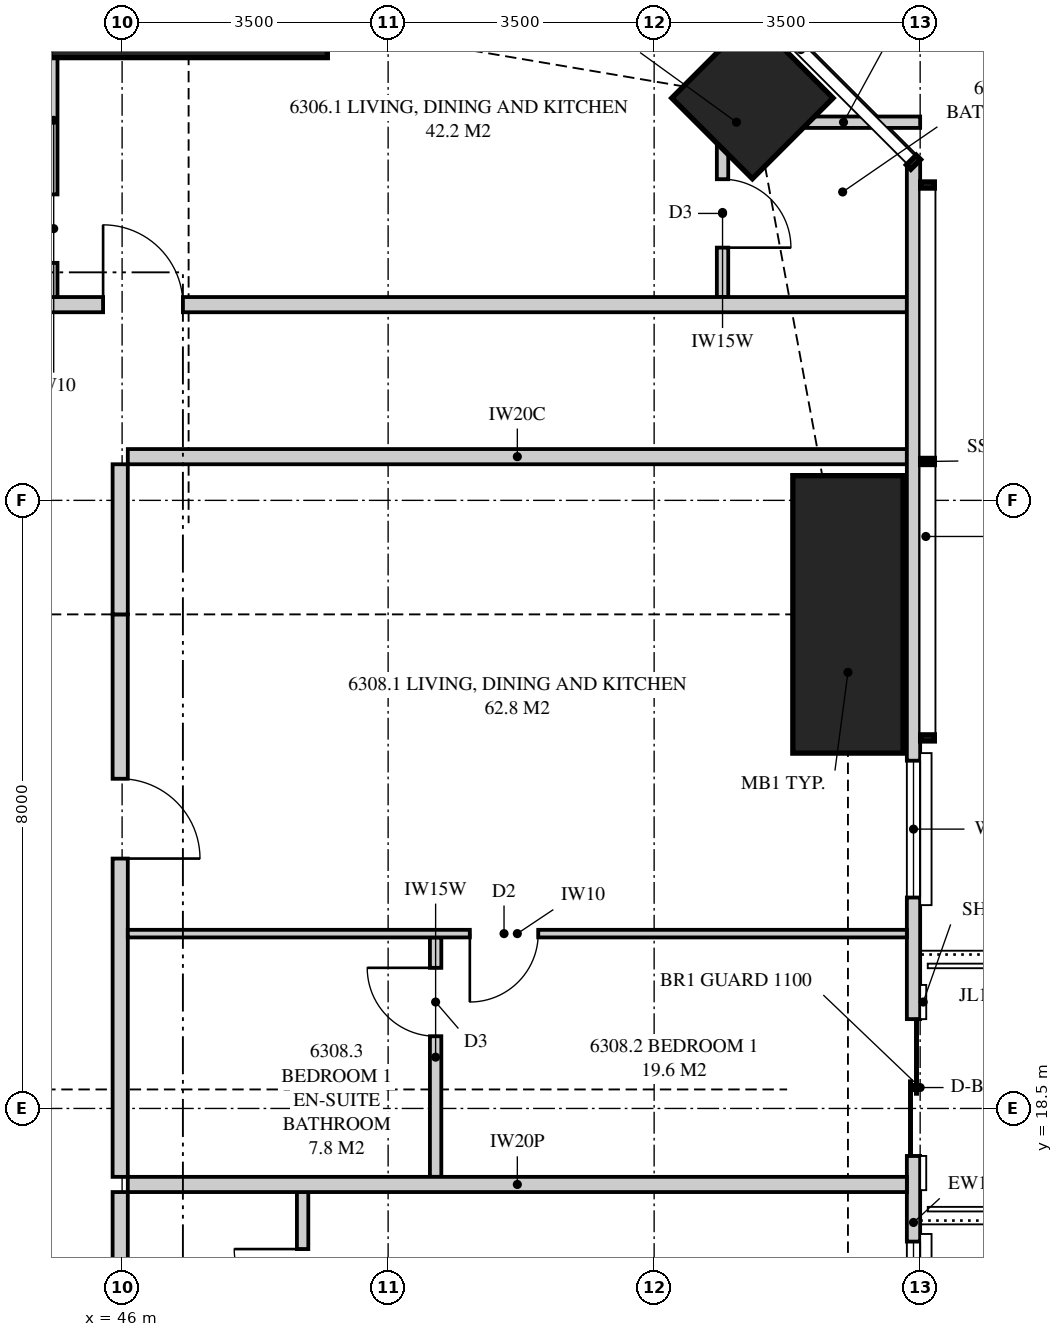
"""IFC4 building model, lengths in metres.
Left out: names, types, materials, properties, quantities, classifications, styles, units other than length and angle.
Written with IfcOpenShell. Run it as: python <this file> out.ifc"""

import sys

from ifc_helpers import new_model, si_unit, direction, frame, frame_2d, origin, origin_2d, place, context, subcontext, project, spatial, polyline, rectangle, outline, extrude, element, fill, save


model = new_model("IFC4")
c1 = context("Model", 3, precision=1e-05, world=origin(), true_north=direction((0.0, 1.0)))
c2 = subcontext(c1, "Body", "Model", "MODEL_VIEW")
j1 = project(units=[si_unit("LENGTHUNIT", "METRE"), si_unit("PLANEANGLEUNIT", "RADIAN")], contexts=[c1])
p1 = place(None, origin())
s1 = spatial("IfcSite", under=j1, at=p1, CompositionType="ELEMENT")
p2 = place(p1, origin())
s2 = spatial("IfcBuilding", under=s1, at=p2, CompositionType="ELEMENT")
p3 = place(p2, frame((0.0, 0.0, 231.95)))
s3 = spatial("IfcBuildingStorey", under=s2, at=p3, CompositionType="ELEMENT", Elevation=231.95)
p4 = place(p3, frame((55.55, 25.0, 0.0), z_axis=(0.0, 0.0, 1.0), x_axis=(1.0, 0.0, 0.0)))
e1 = element("IfcColumn", 1, at=p4, inside=s3, PredefinedType="COLUMN", context=c2, shape_type="SweptSolid", body=[
    extrude(rectangle(XDim=1.45, YDim=3.65, at=origin_2d()), origin(), (0.0, 0.0, 1.0), 3.5),
])
p5 = place(p3, frame((54.293, 31.793, 0.0), z_axis=(0.0, 0.0, 1.0), x_axis=(0.707106781187, 0.707106781187, 0.0)))
e2 = element("IfcColumn", 2, at=p5, inside=s3, PredefinedType="COLUMN", context=c2, shape_type="SweptSolid", body=[
    extrude(rectangle(XDim=1.5, YDim=1.5, at=origin_2d()), origin(), (0.0, 0.0, 1.0), 3.5),
])
p6 = place(p3, frame((46.875, 33.05, 0.0), z_axis=(0.0, 0.0, 1.0), x_axis=(0.0, 1.0, 0.0)))
e3 = element("IfcColumn", 3, at=p6, inside=s3, PredefinedType="COLUMN", context=c2, shape_type="SweptSolid", body=[
    extrude(rectangle(XDim=1.45, YDim=3.65, at=origin_2d()), origin(), (0.0, 0.0, 1.0), 3.5),
])
p7 = place(p3, frame((56.413, 3.051, 0.0), z_axis=(0.0, 0.0, 1.0), x_axis=(0.0, 1.0, 0.0)))
e4 = element("IfcWall", 4, at=p7, inside=s3, PredefinedType="SOLIDWALL", context=c2, shape_type="SweptSolid", body=[
    extrude(outline(polyline([(0.0, 0.0), (27.897, 0.0), (27.897, 3.26), (22.157, 3.26), (22.157, 2.3), (22.092, 2.3), (22.092, 3.26), (21.949, 3.26), (21.949, 2.3), (9.949, 2.3), (9.949, 3.26), (9.858, 3.26), (9.858, 2.3), (9.688, 2.3), (9.688, 3.26), (0.0, 3.26), (0.0, 0.0)])), frame((0.0, 0.087, 0.0), z_axis=(0.0, -1.0, 0.0), x_axis=(1.0, 0.0, 0.0)), (0.0, 0.0, 1.0), 0.175),
])
p8 = place(p7, frame((1.187, 0.0, 0.4)))
e5 = element("IfcOpeningElement", 5, at=p8, cuts=e4, PredefinedType="OPENING", context=c2, shape_type="SweptSolid", body=[
    extrude(rectangle(XDim=2.4, YDim=1.85, at=frame_2d((1.2, 0.925))), frame((0.0, 0.097, 0.0), z_axis=(0.0, -1.0, 0.0), x_axis=(1.0, 0.0, 0.0)), (0.0, 0.0, 1.0), 0.195),
])
p9 = place(p7, frame((11.897, 0.0, 0.4)))
e6 = element("IfcOpeningElement", 6, at=p9, cuts=e4, PredefinedType="OPENING", context=c2, shape_type="SweptSolid", body=[
    extrude(rectangle(XDim=1.8, YDim=1.85, at=frame_2d((0.9, 0.925))), frame((0.0, 0.097, 0.0), z_axis=(0.0, -1.0, 0.0), x_axis=(1.0, 0.0, 0.0)), (0.0, 0.0, 1.0), 0.195),
])
p10 = place(p7, frame((14.824, 0.0, 0.0)))
e7 = element("IfcOpeningElement", 7, at=p10, cuts=e4, PredefinedType="OPENING", context=c2, shape_type="SweptSolid", body=[
    extrude(rectangle(XDim=1.8, YDim=2.25, at=frame_2d((0.9, 1.125))), frame((0.0, 0.097, 0.0), z_axis=(0.0, -1.0, 0.0), x_axis=(1.0, 0.0, 0.0)), (0.0, 0.0, 1.0), 0.195),
])
p11 = place(p7, frame((18.224, 0.0, 0.4)))
e8 = element("IfcOpeningElement", 8, at=p11, cuts=e4, PredefinedType="OPENING", context=c2, shape_type="SweptSolid", body=[
    extrude(rectangle(XDim=1.8, YDim=1.85, at=frame_2d((0.9, 0.925))), frame((0.0, 0.097, 0.0), z_axis=(0.0, -1.0, 0.0), x_axis=(1.0, 0.0, 0.0)), (0.0, 0.0, 1.0), 0.195),
])
p12 = place(p3, frame((46.075, 27.075, 0.0), z_axis=(0.0, 0.0, 1.0), x_axis=(1.0, 0.0, 0.0)))
e9 = element("IfcWall", 9, at=p12, inside=s3, PredefinedType="PARTITIONING", context=c2, shape_type="SweptSolid", body=[
    extrude(outline(polyline([(0.0, 0.0), (10.25, 0.0), (10.25, 3.26), (10.017, 3.26), (10.017, 2.3), (8.166, 2.3), (8.166, 3.26), (2.11, 3.26), (2.11, 2.66), (0.0, 2.66), (0.0, 3.26), (0.0, 0.0)])), frame((0.0, 0.1, 0.0), z_axis=(0.0, -1.0, 0.0), x_axis=(1.0, 0.0, 0.0)), (0.0, 0.0, 1.0), 0.2),
])
p13 = place(p3, frame((36.1, 29.075, 0.0), z_axis=(0.0, 0.0, 1.0), x_axis=(1.0, 0.0, 0.0)))
e10 = element("IfcWall", 10, at=p13, inside=s3, PredefinedType="PARTITIONING", context=c2, shape_type="SweptSolid", body=[
    extrude(outline(polyline([(0.0, 0.0), (20.225, 0.0), (20.225, 3.26), (19.621, 3.26), (19.621, 2.3), (17.771, 2.3), (17.771, 3.26), (12.085, 3.26), (12.085, 2.66), (9.465, 2.66), (9.465, 3.26), (2.46, 3.26), (2.46, 2.66), (0.0, 2.66), (0.0, 3.26), (0.0, 0.0)])), frame((0.0, 0.1, 0.0), z_axis=(0.0, -1.0, 0.0), x_axis=(1.0, 0.0, 0.0)), (0.0, 0.0, 1.0), 0.2),
])
p14 = place(p13, frame((9.65, 0.0, 0.0)))
e11 = element("IfcOpeningElement", 11, at=p14, cuts=e10, PredefinedType="OPENING", context=c2, shape_type="SweptSolid", body=[
    extrude(rectangle(XDim=1.05, YDim=2.2, at=frame_2d((0.525, 1.1))), frame((0.0, 0.11, 0.0), z_axis=(0.0, -1.0, 0.0), x_axis=(1.0, 0.0, 0.0)), (0.0, 0.0, 1.0), 0.22),
])
p15 = place(p3, frame((53.975, 31.475, 0.0), z_axis=(0.0, 0.0, 1.0), x_axis=(1.0, 0.0, 0.0)))
e12 = element("IfcWall", 12, at=p15, inside=s3, PredefinedType="PLUMBINGWALL", context=c2, shape_type="SweptSolid", body=[
    extrude(rectangle(XDim=0.217, YDim=0.15, at=frame_2d((0.108, 0.0))), origin(), (0.0, 0.0, 1.0), 2.3),
])
p16 = place(p3, frame((54.483, 31.475, 0.0), z_axis=(0.0, 0.0, 1.0), x_axis=(1.0, 0.0, 0.0)))
e13 = element("IfcWall", 13, at=p16, inside=s3, PredefinedType="PLUMBINGWALL", context=c2, shape_type="SweptSolid", body=[
    extrude(outline(polyline([(0.768, 3.26), (0.768, 2.3), (0.407, 2.3), (0.396, 2.239), (0.0, 1.15), (0.396, 0.061), (0.407, 0.0), (2.017, 0.0), (2.017, 3.26), (0.768, 3.26)])), frame((0.0, 0.075, 0.0), z_axis=(0.0, -1.0, 0.0), x_axis=(1.0, 0.0, 0.0)), (0.0, 0.0, 1.0), 0.15),
])
p17 = place(p3, frame((53.9, 31.4, 0.0), z_axis=(0.0, 0.0, 1.0), x_axis=(0.0, -1.0, 0.0)))
e14 = element("IfcWall", 14, at=p17, inside=s3, PredefinedType="PLUMBINGWALL", context=c2, shape_type="SweptSolid", body=[
    extrude(outline(polyline([(0.0, 0.0), (2.225, 0.0), (2.225, 3.26), (2.225, 2.3), (0.438, 2.3), (0.0, 2.3), (0.0, 3.26), (0.0, 0.0)])), frame((0.0, 0.075, 0.0), z_axis=(0.0, -1.0, 0.0), x_axis=(1.0, 0.0, 0.0)), (0.0, 0.0, 1.0), 0.15),
])
p18 = place(p17, frame((0.675, 0.0, 0.0)))
e15 = element("IfcOpeningElement", 15, at=p18, cuts=e14, PredefinedType="OPENING", context=c2, shape_type="SweptSolid", body=[
    extrude(rectangle(XDim=0.9, YDim=2.1, at=frame_2d((0.45, 1.05))), frame((0.0, 0.085, 0.0), z_axis=(0.0, -1.0, 0.0), x_axis=(1.0, 0.0, 0.0)), (0.0, 0.0, 1.0), 0.17),
])
p19 = place(p3, frame((45.1, 33.825, 0.0), z_axis=(0.0, 0.0, 1.0), x_axis=(0.0, -1.0, 0.0)))
e16 = element("IfcWall", 16, at=p19, inside=s3, PredefinedType="PARTITIONING", context=c2, shape_type="SweptSolid", body=[
    extrude(outline(polyline([(0.0, 0.0), (4.65, 0.0), (4.65, 3.26), (1.635, 3.26), (1.635, 2.3), (0.0, 2.3), (0.0, 3.26), (0.0, 0.0)])), frame((0.0, 0.05, 0.0), z_axis=(0.0, -1.0, 0.0), x_axis=(1.0, 0.0, 0.0)), (0.0, 0.0, 1.0), 0.1),
])
p20 = place(p19, frame((3.3, 0.0, 0.0)))
e17 = element("IfcOpeningElement", 17, at=p20, cuts=e16, PredefinedType="OPENING", context=c2, shape_type="SweptSolid", body=[
    extrude(rectangle(XDim=0.9, YDim=2.1, at=frame_2d((0.45, 1.05))), frame((0.0, 0.06, 0.0), z_axis=(0.0, -1.0, 0.0), x_axis=(1.0, 0.0, 0.0)), (0.0, 0.0, 1.0), 0.12),
])
p21 = place(p3, frame((56.325, 17.5, 0.0), z_axis=(0.0, 0.0, 1.0), x_axis=(-1.0, 0.0, 0.0)))
e18 = element("IfcWall", 18, at=p21, inside=s3, PredefinedType="PARTITIONING", context=c2, shape_type="SweptSolid", body=[
    extrude(outline(polyline([(0.0, 0.0), (10.25, 0.0), (10.25, 3.26), (10.25, 2.66), (1.685, 2.66), (1.685, 2.3), (0.0, 2.3), (0.0, 3.26), (0.0, 0.0)])), frame((0.0, 0.1, 0.0), z_axis=(0.0, -1.0, 0.0), x_axis=(1.0, 0.0, 0.0)), (0.0, 0.0, 1.0), 0.2),
])
p22 = place(p3, frame((45.975, 13.0, 0.0), z_axis=(0.0, 0.0, 1.0), x_axis=(0.0, 1.0, 0.0)))
e19 = element("IfcWall", 19, at=p22, inside=s3, PredefinedType="PARTITIONING", context=c2, shape_type="SweptSolid", body=[
    extrude(outline(polyline([(0.0, 0.0), (4.4, 0.0), (4.4, 3.26), (1.31, 3.26), (1.31, 2.66), (0.0, 2.66), (0.0, 0.0)])), frame((0.0, 0.1, 0.0), z_axis=(0.0, -1.0, 0.0), x_axis=(1.0, 0.0, 0.0)), (0.0, 0.0, 1.0), 0.2),
])
p23 = place(p22, frame((0.212, 0.0, 0.0)))
e20 = element("IfcOpeningElement", 20, at=p23, cuts=e19, PredefinedType="OPENING", context=c2, shape_type="SweptSolid", body=[
    extrude(rectangle(XDim=1.05, YDim=2.2, at=frame_2d((0.525, 1.1))), frame((0.0, 0.11, 0.0), z_axis=(0.0, -1.0, 0.0), x_axis=(1.0, 0.0, 0.0)), (0.0, 0.0, 1.0), 0.22),
])
p24 = place(p3, frame((48.375, 14.975, 0.0), z_axis=(0.0, 0.0, 1.0), x_axis=(0.0, 1.0, 0.0)))
e21 = element("IfcWall", 21, at=p24, inside=s3, PredefinedType="PLUMBINGWALL", context=c2, shape_type="SweptSolid", body=[
    extrude(rectangle(XDim=2.425, YDim=0.15, at=frame_2d((1.212, 0.0))), origin(), (0.0, 0.0, 1.0), 3.26),
])
p25 = place(p24, frame((0.775, 0.0, 0.0)))
e22 = element("IfcOpeningElement", 22, at=p25, cuts=e21, PredefinedType="OPENING", context=c2, shape_type="SweptSolid", body=[
    extrude(rectangle(XDim=0.9, YDim=2.1, at=frame_2d((0.45, 1.05))), frame((0.0, 0.085, 0.0), z_axis=(0.0, -1.0, 0.0), x_axis=(1.0, 0.0, 0.0)), (0.0, 0.0, 1.0), 0.17),
])
p26 = place(p3, frame((45.975, 17.6, 0.0), z_axis=(0.0, 0.0, 1.0), x_axis=(0.0, 1.0, 0.0)))
e23 = element("IfcWall", 23, at=p26, inside=s3, PredefinedType="PARTITIONING", context=c2, shape_type="SweptSolid", body=[
    extrude(outline(polyline([(0.0, 0.0), (7.4, 0.0), (7.4, 2.66), (6.09, 2.66), (6.09, 3.26), (2.46, 3.26), (2.46, 2.66), (0.0, 2.66), (0.0, 0.0)])), frame((0.0, 0.1, 0.0), z_axis=(0.0, -1.0, 0.0), x_axis=(1.0, 0.0, 0.0)), (0.0, 0.0, 1.0), 0.2),
])
p27 = place(p26, frame((4.188, 0.0, 0.0)))
e24 = element("IfcOpeningElement", 24, at=p27, cuts=e23, PredefinedType="OPENING", context=c2, shape_type="SweptSolid", body=[
    extrude(rectangle(XDim=1.05, YDim=2.2, at=frame_2d((0.525, 1.1))), frame((0.0, 0.11, 0.0), z_axis=(0.0, -1.0, 0.0), x_axis=(1.0, 0.0, 0.0)), (0.0, 0.0, 1.0), 0.22),
])
p28 = place(p3, frame((45.975, 25.0, 0.0), z_axis=(0.0, 0.0, 1.0), x_axis=(0.0, 1.0, 0.0)))
e25 = element("IfcWall", 25, at=p28, inside=s3, PredefinedType="PARTITIONING", context=c2, shape_type="SweptSolid", body=[
    extrude(rectangle(XDim=1.975, YDim=0.2, at=frame_2d((0.988, 0.0))), origin(), (0.0, 0.0, 1.0), 2.66),
])
p29 = place(p3, frame((56.325, 20.8, 0.0), z_axis=(0.0, 0.0, 1.0), x_axis=(-1.0, 0.0, 0.0)))
e26 = element("IfcWall", 26, at=p29, inside=s3, PredefinedType="PARTITIONING", context=c2, shape_type="SweptSolid", body=[
    extrude(outline(polyline([(0.0, 0.0), (10.25, 0.0), (10.25, 3.26), (1.635, 3.26), (1.635, 2.3), (0.0, 2.3), (0.0, 3.26), (0.0, 0.0)])), frame((0.0, 0.05, 0.0), z_axis=(0.0, -1.0, 0.0), x_axis=(1.0, 0.0, 0.0)), (0.0, 0.0, 1.0), 0.1),
])
p30 = place(p29, frame((4.85, 0.0, 0.0)))
e27 = element("IfcOpeningElement", 27, at=p30, cuts=e26, PredefinedType="OPENING", context=c2, shape_type="SweptSolid", body=[
    extrude(rectangle(XDim=0.9, YDim=2.1, at=frame_2d((0.45, 1.05))), frame((0.0, 0.06, 0.0), z_axis=(0.0, -1.0, 0.0), x_axis=(1.0, 0.0, 0.0)), (0.0, 0.0, 1.0), 0.12),
])
p31 = place(p3, frame((50.125, 17.6, 0.0), z_axis=(0.0, 0.0, 1.0), x_axis=(0.0, 1.0, 0.0)))
e28 = element("IfcWall", 28, at=p31, inside=s3, PredefinedType="PLUMBINGWALL", context=c2, shape_type="SweptSolid", body=[
    extrude(outline(polyline([(0.0, 0.0), (3.15, 0.0), (3.15, 3.26), (2.435, 3.26), (2.435, 2.66), (0.0, 2.66), (0.0, 3.26), (0.0, 0.0)])), frame((0.0, 0.075, 0.0), z_axis=(0.0, -1.0, 0.0), x_axis=(1.0, 0.0, 0.0)), (0.0, 0.0, 1.0), 0.15),
])
p32 = place(p31, frame((1.85, 0.0, 0.0)))
e29 = element("IfcOpeningElement", 29, at=p32, cuts=e28, PredefinedType="OPENING", context=c2, shape_type="SweptSolid", body=[
    extrude(rectangle(XDim=0.9, YDim=2.1, at=frame_2d((0.45, 1.05))), frame((0.0, 0.085, 0.0), z_axis=(0.0, -1.0, 0.0), x_axis=(1.0, 0.0, 0.0)), (0.0, 0.0, 1.0), 0.17),
])
p33 = place(p9, origin())
e30 = element("IfcWindow", 30, at=p33, inside=s3, PartitioningType="SINGLE_PANEL", PredefinedType="WINDOW", context=c2, shape_type="SweptSolid", body=[
    extrude(rectangle(XDim=1.8, YDim=1.85, at=frame_2d((0.9, 0.925))), frame((0.0, 0.03, 0.0), z_axis=(0.0, -1.0, 0.0), x_axis=(1.0, 0.0, 0.0)), (0.0, 0.0, 1.0), 0.06),
])
fill(e6, e30)
p34 = place(p10, origin())
e31 = element("IfcDoor", 31, at=p34, inside=s3, OperationType="SLIDING_TO_LEFT", PredefinedType="DOOR", context=c2, shape_type="SweptSolid", body=[
    extrude(rectangle(XDim=1.8, YDim=2.25, at=frame_2d((0.9, 1.125))), frame((0.0, 0.025, 0.0), z_axis=(0.0, -1.0, 0.0), x_axis=(1.0, 0.0, 0.0)), (0.0, 0.0, 1.0), 0.05),
])
fill(e7, e31)
p35 = place(p11, origin())
e32 = element("IfcWindow", 32, at=p35, inside=s3, PartitioningType="SINGLE_PANEL", PredefinedType="WINDOW", context=c2, shape_type="SweptSolid", body=[
    extrude(rectangle(XDim=1.8, YDim=1.85, at=frame_2d((0.9, 0.925))), frame((0.0, 0.03, 0.0), z_axis=(0.0, -1.0, 0.0), x_axis=(1.0, 0.0, 0.0)), (0.0, 0.0, 1.0), 0.06),
])
fill(e8, e32)
p36 = place(p14, origin())
e33 = element("IfcDoor", 33, at=p36, inside=s3, OperationType="SINGLE_SWING_LEFT", PredefinedType="DOOR", context=c2, shape_type="SweptSolid", body=[
    extrude(rectangle(XDim=1.05, YDim=2.2, at=frame_2d((0.525, 1.1))), frame((0.0, 0.025, 0.0), z_axis=(0.0, -1.0, 0.0), x_axis=(1.0, 0.0, 0.0)), (0.0, 0.0, 1.0), 0.05),
])
fill(e11, e33)
p37 = place(p18, origin())
e34 = element("IfcDoor", 34, at=p37, inside=s3, OperationType="SINGLE_SWING_RIGHT", PredefinedType="DOOR", context=c2, shape_type="SweptSolid", body=[
    extrude(rectangle(XDim=0.9, YDim=2.1, at=frame_2d((0.45, 1.05))), frame((0.0, 0.025, 0.0), z_axis=(0.0, -1.0, 0.0), x_axis=(1.0, 0.0, 0.0)), (0.0, 0.0, 1.0), 0.05),
])
fill(e15, e34)
p38 = place(p20, frame((0.9, 0.0, 0.0), z_axis=(0.0, 0.0, 1.0), x_axis=(-1.0, 0.0, 0.0)))
e35 = element("IfcDoor", 35, at=p38, inside=s3, OperationType="SINGLE_SWING_LEFT", PredefinedType="DOOR", context=c2, shape_type="SweptSolid", body=[
    extrude(rectangle(XDim=0.9, YDim=2.1, at=frame_2d((0.45, 1.05))), frame((0.0, 0.025, 0.0), z_axis=(0.0, -1.0, 0.0), x_axis=(1.0, 0.0, 0.0)), (0.0, 0.0, 1.0), 0.05),
])
fill(e17, e35)
p39 = place(p25, origin())
e36 = element("IfcDoor", 36, at=p39, inside=s3, OperationType="SINGLE_SWING_RIGHT", PredefinedType="DOOR", context=c2, shape_type="SweptSolid", body=[
    extrude(rectangle(XDim=0.9, YDim=2.1, at=frame_2d((0.45, 1.05))), frame((0.0, 0.025, 0.0), z_axis=(0.0, -1.0, 0.0), x_axis=(1.0, 0.0, 0.0)), (0.0, 0.0, 1.0), 0.05),
])
fill(e22, e36)
p40 = place(p27, frame((1.05, 0.0, 0.0), z_axis=(0.0, 0.0, 1.0), x_axis=(-1.0, 0.0, 0.0)))
e37 = element("IfcDoor", 37, at=p40, inside=s3, OperationType="SINGLE_SWING_RIGHT", PredefinedType="DOOR", context=c2, shape_type="SweptSolid", body=[
    extrude(rectangle(XDim=1.05, YDim=2.2, at=frame_2d((0.525, 1.1))), frame((0.0, 0.025, 0.0), z_axis=(0.0, -1.0, 0.0), x_axis=(1.0, 0.0, 0.0)), (0.0, 0.0, 1.0), 0.05),
])
fill(e24, e37)
p41 = place(p30, origin())
e38 = element("IfcDoor", 38, at=p41, inside=s3, OperationType="SINGLE_SWING_RIGHT", PredefinedType="DOOR", context=c2, shape_type="SweptSolid", body=[
    extrude(rectangle(XDim=0.9, YDim=2.1, at=frame_2d((0.45, 1.05))), frame((0.0, 0.025, 0.0), z_axis=(0.0, -1.0, 0.0), x_axis=(1.0, 0.0, 0.0)), (0.0, 0.0, 1.0), 0.05),
])
fill(e27, e38)
p42 = place(p32, origin())
e39 = element("IfcDoor", 39, at=p42, inside=s3, OperationType="SINGLE_SWING_RIGHT", PredefinedType="DOOR", context=c2, shape_type="SweptSolid", body=[
    extrude(rectangle(XDim=0.9, YDim=2.1, at=frame_2d((0.45, 1.05))), frame((0.0, 0.025, 0.0), z_axis=(0.0, -1.0, 0.0), x_axis=(1.0, 0.0, 0.0)), (0.0, 0.0, 1.0), 0.05),
])
fill(e29, e39)
save(model, sys.argv[1])
